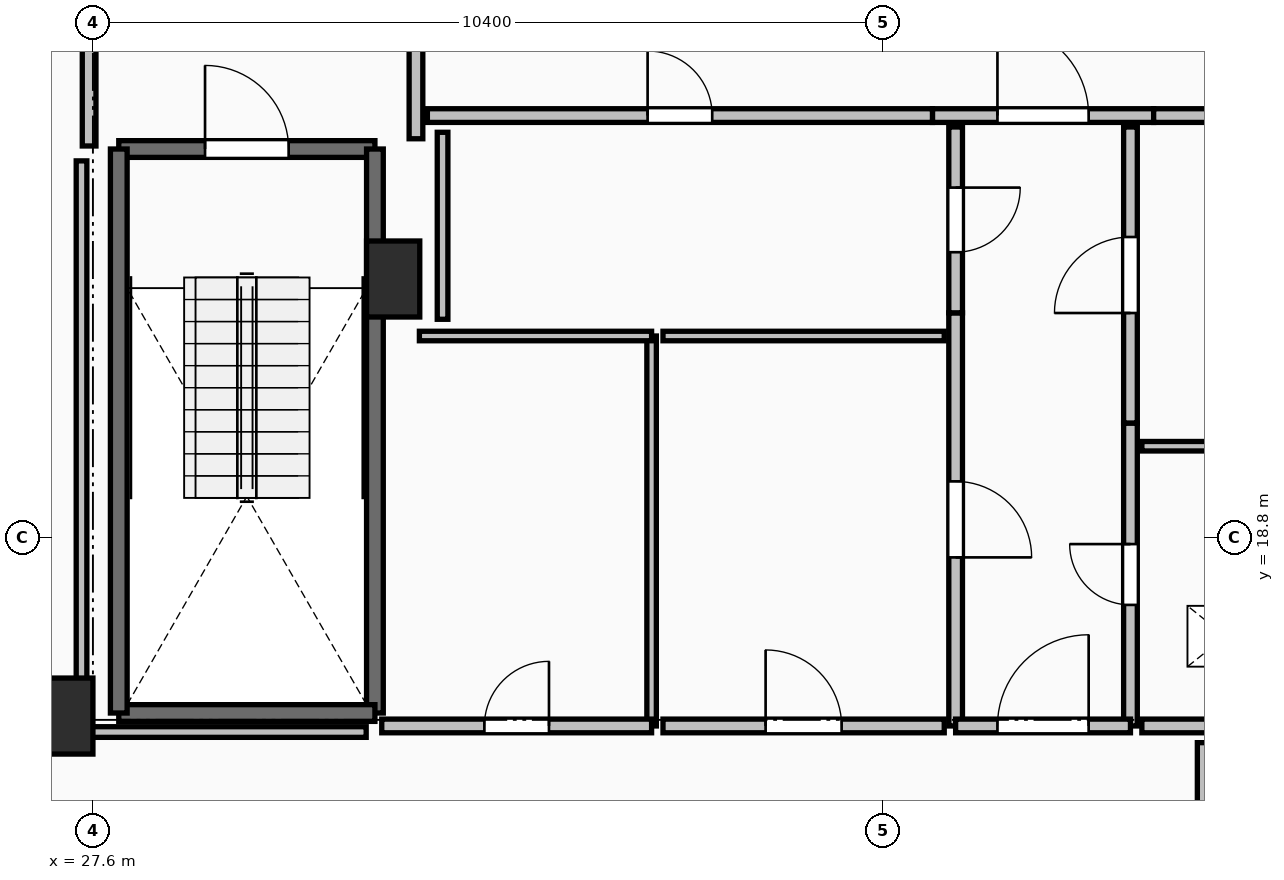
"""IFC4 building model, lengths in metres.
Left out: names, types, materials, properties, quantities, classifications, styles, units other than length and angle.
Written with IfcOpenShell. Run it as: python <this file> out.ifc"""

import sys

from ifc_helpers import new_model, si_unit, direction, frame, frame_2d, origin, origin_2d, place, context, subcontext, project, spatial, rectangle, extrude, element, fill, save


model = new_model("IFC4")
c1 = context("Model", 3, precision=1e-05, world=origin(), true_north=direction((0.0, 1.0)))
c2 = subcontext(c1, "Body", "Model", "MODEL_VIEW")
j1 = project(units=[si_unit("LENGTHUNIT", "METRE"), si_unit("PLANEANGLEUNIT", "RADIAN")], contexts=[c1])
p1 = place(None, origin())
s1 = spatial("IfcSite", under=j1, at=p1, CompositionType="ELEMENT")
p2 = place(p1, origin())
s2 = spatial("IfcBuilding", under=s1, at=p2, CompositionType="ELEMENT")
p3 = place(p2, frame((0.0, 0.0, 276.85)))
s3 = spatial("IfcBuildingStorey", under=s2, at=p3, CompositionType="ELEMENT", Elevation=276.85)
for number, where, z_axis, x_axis in (
    (1, (27.25, 16.45, 0.0), (0.0, 0.0, 1.0), (1.0, 0.0, 0.0)),
    (2, (31.55, 22.2, 0.0), (0.0, 0.0, 1.0), (1.0, 0.0, 0.0)),
):
    element("IfcColumn", number, at=place(p3, frame(where, z_axis=z_axis, x_axis=x_axis)), inside=s3, PredefinedType="PILASTER", context=c2, shape_type="SweptSolid", body=[
        extrude(rectangle(XDim=0.7, YDim=1.0, at=origin_2d()), origin(), (0.0, 0.0, 1.0), 3.55),
    ])
p4 = place(p3, frame((27.94, 23.91, 0.0), z_axis=(0.0, 0.0, 1.0), x_axis=(1.0, 0.0, 0.0)))
e3 = element("IfcWall", 3, at=p4, inside=s3, PredefinedType="SOLIDWALL", context=c2, shape_type="SweptSolid", body=[
    extrude(rectangle(XDim=3.37, YDim=0.22, at=frame_2d((1.685, 0.0))), origin(), (0.0, 0.0, 1.0), 3.19),
])
p5 = place(p4, frame((1.135, 0.0, 0.0)))
e4 = element("IfcOpeningElement", 4, at=p5, cuts=e3, PredefinedType="OPENING", context=c2, shape_type="SweptSolid", body=[
    extrude(rectangle(XDim=1.1, YDim=2.15, at=frame_2d((0.55, 1.075))), frame((0.0, 0.125, 0.0), z_axis=(0.0, -1.0, 0.0), x_axis=(1.0, 0.0, 0.0)), (0.0, 0.0, 1.0), 0.25),
])
p6 = place(p3, frame((31.31, 23.91, 0.0), z_axis=(0.0, 0.0, 1.0), x_axis=(0.0, -1.0, 0.0)))
e5 = element("IfcWall", 5, at=p6, inside=s3, PredefinedType="SOLIDWALL", context=c2, shape_type="SweptSolid", body=[
    extrude(rectangle(XDim=7.42, YDim=0.22, at=frame_2d((3.71, 0.0))), origin(), (0.0, 0.0, 1.0), 3.19),
])
p7 = place(p3, frame((31.31, 16.49, 0.0), z_axis=(0.0, 0.0, 1.0), x_axis=(-1.0, 0.0, 0.0)))
e6 = element("IfcWall", 6, at=p7, inside=s3, PredefinedType="SOLIDWALL", context=c2, shape_type="SweptSolid", body=[
    extrude(rectangle(XDim=3.37, YDim=0.22, at=frame_2d((1.685, 0.0))), origin(), (0.0, 0.0, 1.0), 3.19),
])
p8 = place(p3, frame((27.94, 16.49, 0.0), z_axis=(0.0, 0.0, 1.0), x_axis=(0.0, 1.0, 0.0)))
e7 = element("IfcWall", 7, at=p8, inside=s3, PredefinedType="SOLIDWALL", context=c2, shape_type="SweptSolid", body=[
    extrude(rectangle(XDim=7.42, YDim=0.22, at=frame_2d((3.71, 0.0))), origin(), (0.0, 0.0, 1.0), 3.19),
])
p9 = place(p3, frame((31.85, 24.045, 0.0), z_axis=(0.0, 0.0, 1.0), x_axis=(0.0, 1.0, 0.0)))
e8 = element("IfcWall", 8, at=p9, inside=s3, PredefinedType="PARTITIONING", context=c2, shape_type="SweptSolid", body=[
    extrude(rectangle(XDim=3.91, YDim=0.18, at=frame_2d((1.955, 0.0))), origin(), (0.0, 0.0, 1.0), 3.19),
])
p10 = place(p9, frame((1.355, 0.0, 0.0)))
e9 = element("IfcOpeningElement", 9, at=p10, cuts=e8, PredefinedType="OPENING", context=c2, shape_type="SweptSolid", body=[
    extrude(rectangle(XDim=1.2, YDim=2.15, at=frame_2d((0.6, 1.075))), frame((0.0, 0.105, 0.0), z_axis=(0.0, -1.0, 0.0), x_axis=(1.0, 0.0, 0.0)), (0.0, 0.0, 1.0), 0.21),
])
p11 = place(p3, frame((27.55, 28.0, 0.0), z_axis=(0.0, 0.0, 1.0), x_axis=(0.0, -1.0, 0.0)))
e10 = element("IfcWall", 10, at=p11, inside=s3, PredefinedType="PARTITIONING", context=c2, shape_type="SweptSolid", body=[
    extrude(rectangle(XDim=4.05, YDim=0.18, at=frame_2d((2.025, 0.0))), origin(), (0.0, 0.0, 1.0), 3.19),
])
p12 = place(p11, frame((1.425, 0.0, 0.0)))
e11 = element("IfcOpeningElement", 11, at=p12, cuts=e10, PredefinedType="OPENING", context=c2, shape_type="SweptSolid", body=[
    extrude(rectangle(XDim=1.2, YDim=2.15, at=frame_2d((0.6, 1.075))), frame((0.0, 0.105, 0.0), z_axis=(0.0, -1.0, 0.0), x_axis=(1.0, 0.0, 0.0)), (0.0, 0.0, 1.0), 0.21),
])
p13 = place(p3, frame((38.645, 24.35, 0.0), z_axis=(0.0, 0.0, 1.0), x_axis=(1.0, 0.0, 0.0)))
e12 = element("IfcWall", 12, at=p13, inside=s3, PredefinedType="PARTITIONING", context=c2, shape_type="SweptSolid", body=[
    extrude(rectangle(XDim=2.91, YDim=0.18, at=frame_2d((1.455, 0.0))), origin(), (0.0, 0.0, 1.0), 3.19),
])
p14 = place(p13, frame((0.855, 0.0, 0.0)))
e13 = element("IfcOpeningElement", 13, at=p14, cuts=e12, PredefinedType="OPENING", context=c2, shape_type="SweptSolid", body=[
    extrude(rectangle(XDim=1.2, YDim=2.15, at=frame_2d((0.6, 1.075))), frame((0.0, 0.105, 0.0), z_axis=(0.0, -1.0, 0.0), x_axis=(1.0, 0.0, 0.0)), (0.0, 0.0, 1.0), 0.21),
])
p15 = place(p3, frame((41.555, 24.35, 0.0), z_axis=(0.0, 0.0, 1.0), x_axis=(1.0, 0.0, 0.0)))
e14 = element("IfcWall", 14, at=p15, inside=s3, PredefinedType="PARTITIONING", context=c2, shape_type="SweptSolid", body=[
    extrude(rectangle(XDim=2.445, YDim=0.18, at=frame_2d((1.223, 0.0))), origin(), (0.0, 0.0, 1.0), 3.19),
])
p16 = place(p15, frame((0.722, 0.0, 0.0)))
e15 = element("IfcOpeningElement", 15, at=p16, cuts=e14, PredefinedType="OPENING", context=c2, shape_type="SweptSolid", body=[
    extrude(rectangle(XDim=1.0, YDim=2.15, at=frame_2d((0.5, 1.075))), frame((0.0, 0.105, 0.0), z_axis=(0.0, -1.0, 0.0), x_axis=(1.0, 0.0, 0.0)), (0.0, 0.0, 1.0), 0.21),
])
p17 = place(p3, frame((32.0, 24.35, 0.0), z_axis=(0.0, 0.0, 1.0), x_axis=(1.0, 0.0, 0.0)))
e16 = element("IfcWall", 16, at=p17, inside=s3, PredefinedType="PARTITIONING", context=c2, shape_type="SweptSolid", body=[
    extrude(rectangle(XDim=6.645, YDim=0.18, at=frame_2d((3.323, 0.0))), origin(), (0.0, 0.0, 1.0), 3.19),
])
p18 = place(p17, frame((2.897, 0.0, 0.0)))
e17 = element("IfcOpeningElement", 17, at=p18, cuts=e16, PredefinedType="OPENING", context=c2, shape_type="SweptSolid", body=[
    extrude(rectangle(XDim=0.85, YDim=2.1, at=frame_2d((0.425, 1.05))), frame((0.0, 0.105, 0.0), z_axis=(0.0, -1.0, 0.0), x_axis=(1.0, 0.0, 0.0)), (0.0, 0.0, 1.0), 0.21),
])
p19 = place(p3, frame((41.25, 16.32, 0.0), z_axis=(0.0, 0.0, 1.0), x_axis=(0.0, 1.0, 0.0)))
e18 = element("IfcWall", 18, at=p19, inside=s3, PredefinedType="PARTITIONING", context=c2, shape_type="SweptSolid", body=[
    extrude(rectangle(XDim=3.985, YDim=0.18, at=frame_2d((1.992, 0.0))), origin(), (0.0, 0.0, 1.0), 3.19),
])
p20 = place(p19, frame((1.593, 0.0, 0.0)))
e19 = element("IfcOpeningElement", 19, at=p20, cuts=e18, PredefinedType="OPENING", context=c2, shape_type="SweptSolid", body=[
    extrude(rectangle(XDim=0.8, YDim=2.05, at=frame_2d((0.4, 1.025))), frame((0.0, 0.105, 0.0), z_axis=(0.0, -1.0, 0.0), x_axis=(1.0, 0.0, 0.0)), (0.0, 0.0, 1.0), 0.21),
])
p21 = place(p3, frame((41.25, 20.305, 0.0), z_axis=(0.0, 0.0, 1.0), x_axis=(0.0, 1.0, 0.0)))
e20 = element("IfcWall", 20, at=p21, inside=s3, PredefinedType="PARTITIONING", context=c2, shape_type="SweptSolid", body=[
    extrude(rectangle(XDim=3.895, YDim=0.18, at=frame_2d((1.948, 0.0))), origin(), (0.0, 0.0, 1.0), 3.19),
])
p22 = place(p21, frame((1.448, 0.0, 0.0)))
e21 = element("IfcOpeningElement", 21, at=p22, cuts=e20, PredefinedType="OPENING", context=c2, shape_type="SweptSolid", body=[
    extrude(rectangle(XDim=1.0, YDim=2.15, at=frame_2d((0.5, 1.075))), frame((0.0, 0.105, 0.0), z_axis=(0.0, -1.0, 0.0), x_axis=(1.0, 0.0, 0.0)), (0.0, 0.0, 1.0), 0.21),
])
p23 = place(p3, frame((38.95, 21.755, 0.0), z_axis=(0.0, 0.0, 1.0), x_axis=(0.0, -1.0, 0.0)))
e22 = element("IfcWall", 22, at=p23, inside=s3, PredefinedType="PARTITIONING", context=c2, shape_type="SweptSolid", body=[
    extrude(rectangle(XDim=5.435, YDim=0.18, at=frame_2d((2.717, 0.0))), origin(), (0.0, 0.0, 1.0), 3.19),
])
p24 = place(p23, frame((2.218, 0.0, 0.0)))
e23 = element("IfcOpeningElement", 23, at=p24, cuts=e22, PredefinedType="OPENING", context=c2, shape_type="SweptSolid", body=[
    extrude(rectangle(XDim=1.0, YDim=2.15, at=frame_2d((0.5, 1.075))), frame((0.0, 0.105, 0.0), z_axis=(0.0, -1.0, 0.0), x_axis=(1.0, 0.0, 0.0)), (0.0, 0.0, 1.0), 0.21),
])
p25 = place(p3, frame((38.95, 24.2, 0.0), z_axis=(0.0, 0.0, 1.0), x_axis=(0.0, -1.0, 0.0)))
e24 = element("IfcWall", 24, at=p25, inside=s3, PredefinedType="PARTITIONING", context=c2, shape_type="SweptSolid", body=[
    extrude(rectangle(XDim=2.445, YDim=0.18, at=frame_2d((1.223, 0.0))), origin(), (0.0, 0.0, 1.0), 3.19),
])
p26 = place(p25, frame((0.798, 0.0, 0.0)))
e25 = element("IfcOpeningElement", 25, at=p26, cuts=e24, PredefinedType="OPENING", context=c2, shape_type="SweptSolid", body=[
    extrude(rectangle(XDim=0.85, YDim=2.1, at=frame_2d((0.425, 1.05))), frame((0.0, 0.105, 0.0), z_axis=(0.0, -1.0, 0.0), x_axis=(1.0, 0.0, 0.0)), (0.0, 0.0, 1.0), 0.21),
])
p27 = place(p3, frame((38.95, 16.32, 0.0), z_axis=(0.0, 0.0, 1.0), x_axis=(1.0, 0.0, 0.0)))
e26 = element("IfcWall", 26, at=p27, inside=s3, PredefinedType="PARTITIONING", context=c2, shape_type="SweptSolid", body=[
    extrude(rectangle(XDim=2.3, YDim=0.18, at=frame_2d((1.15, 0.0))), origin(), (0.0, 0.0, 1.0), 3.19),
])
p28 = place(p27, frame((0.55, 0.0, 0.0)))
e27 = element("IfcOpeningElement", 27, at=p28, cuts=e26, PredefinedType="OPENING", context=c2, shape_type="SweptSolid", body=[
    extrude(rectangle(XDim=1.2, YDim=2.15, at=frame_2d((0.6, 1.075))), frame((0.0, 0.105, 0.0), z_axis=(0.0, -1.0, 0.0), x_axis=(1.0, 0.0, 0.0)), (0.0, 0.0, 1.0), 0.21),
])
p29 = place(p3, frame((44.6, 20.0, 0.0), z_axis=(0.0, 0.0, 1.0), x_axis=(-1.0, 0.0, 0.0)))
e28 = element("IfcWall", 28, at=p29, inside=s3, PredefinedType="PARTITIONING", context=c2, shape_type="SweptSolid", body=[
    extrude(rectangle(XDim=3.2, YDim=0.125, at=frame_2d((1.6, 0.0))), origin(), (0.0, 0.0, 1.0), 3.19),
])
p30 = place(p3, frame((41.4, 16.32, 0.0), z_axis=(0.0, 0.0, 1.0), x_axis=(1.0, 0.0, 0.0)))
e29 = element("IfcWall", 29, at=p30, inside=s3, PredefinedType="PARTITIONING", context=c2, shape_type="SweptSolid", body=[
    extrude(rectangle(XDim=3.2, YDim=0.18, at=frame_2d((1.6, 0.0))), origin(), (0.0, 0.0, 1.0), 3.19),
])
p31 = place(p30, frame((1.2, 0.0, 0.0)))
e30 = element("IfcOpeningElement", 30, at=p31, cuts=e29, PredefinedType="OPENING", context=c2, shape_type="SweptSolid", body=[
    extrude(rectangle(XDim=0.8, YDim=2.05, at=frame_2d((0.4, 1.025))), frame((0.0, 0.105, 0.0), z_axis=(0.0, -1.0, 0.0), x_axis=(1.0, 0.0, 0.0)), (0.0, 0.0, 1.0), 0.21),
])
p32 = place(p3, frame((34.95, 16.32, 0.0), z_axis=(0.0, 0.0, 1.0), x_axis=(0.0, 1.0, 0.0)))
e31 = element("IfcWall", 31, at=p32, inside=s3, PredefinedType="PARTITIONING", context=c2, shape_type="SweptSolid", body=[
    extrude(rectangle(XDim=5.13, YDim=0.125, at=frame_2d((2.565, 0.0))), origin(), (0.0, 0.0, 1.0), 3.19),
])
p33 = place(p3, frame((34.95, 21.45, 0.0), z_axis=(0.0, 0.0, 1.0), x_axis=(-1.0, 0.0, 0.0)))
e32 = element("IfcWall", 32, at=p33, inside=s3, PredefinedType="PARTITIONING", context=c2, shape_type="SweptSolid", body=[
    extrude(rectangle(XDim=3.055, YDim=0.125, at=frame_2d((1.527, 0.0))), origin(), (0.0, 0.0, 1.0), 3.19),
])
p34 = place(p3, frame((31.4, 16.32, 0.0), z_axis=(0.0, 0.0, 1.0), x_axis=(1.0, 0.0, 0.0)))
e33 = element("IfcWall", 33, at=p34, inside=s3, PredefinedType="PARTITIONING", context=c2, shape_type="SweptSolid", body=[
    extrude(rectangle(XDim=3.55, YDim=0.18, at=frame_2d((1.775, 0.0))), origin(), (0.0, 0.0, 1.0), 3.19),
])
p35 = place(p34, frame((1.35, 0.0, 0.0)))
e34 = element("IfcOpeningElement", 34, at=p35, cuts=e33, PredefinedType="OPENING", context=c2, shape_type="SweptSolid", body=[
    extrude(rectangle(XDim=0.85, YDim=2.1, at=frame_2d((0.425, 1.05))), frame((0.0, 0.105, 0.0), z_axis=(0.0, -1.0, 0.0), x_axis=(1.0, 0.0, 0.0)), (0.0, 0.0, 1.0), 0.21),
])
p36 = place(p3, frame((38.8, 21.45, 0.0), z_axis=(0.0, 0.0, 1.0), x_axis=(-1.0, 0.0, 0.0)))
e35 = element("IfcWall", 35, at=p36, inside=s3, PredefinedType="PARTITIONING", context=c2, shape_type="SweptSolid", body=[
    extrude(rectangle(XDim=3.7, YDim=0.125, at=frame_2d((1.85, 0.0))), origin(), (0.0, 0.0, 1.0), 3.19),
])
p37 = place(p3, frame((35.1, 16.32, 0.0), z_axis=(0.0, 0.0, 1.0), x_axis=(1.0, 0.0, 0.0)))
e36 = element("IfcWall", 36, at=p37, inside=s3, PredefinedType="PARTITIONING", context=c2, shape_type="SweptSolid", body=[
    extrude(rectangle(XDim=3.7, YDim=0.18, at=frame_2d((1.85, 0.0))), origin(), (0.0, 0.0, 1.0), 3.19),
])
p38 = place(p37, frame((1.35, 0.0, 0.0)))
e37 = element("IfcOpeningElement", 37, at=p38, cuts=e36, PredefinedType="OPENING", context=c2, shape_type="SweptSolid", body=[
    extrude(rectangle(XDim=1.0, YDim=2.15, at=frame_2d((0.5, 1.075))), frame((0.0, 0.105, 0.0), z_axis=(0.0, -1.0, 0.0), x_axis=(1.0, 0.0, 0.0)), (0.0, 0.0, 1.0), 0.21),
])
p39 = place(p3, frame((32.2, 24.13, 0.0), z_axis=(0.0, 0.0, 1.0), x_axis=(0.0, -1.0, 0.0)))
e38 = element("IfcWall", 38, at=p39, inside=s3, PredefinedType="PARTITIONING", context=c2, shape_type="SweptSolid", body=[
    extrude(rectangle(XDim=2.46, YDim=0.14, at=frame_2d((1.23, 0.0))), origin(), (0.0, 0.0, 1.0), 3.19),
])
p40 = place(p3, frame((27.45, 23.754, 0.0), z_axis=(0.0, 0.0, 1.0), x_axis=(0.0, -1.0, 0.0)))
e39 = element("IfcWall", 39, at=p40, inside=s3, PredefinedType="PARTITIONING", context=c2, shape_type="SweptSolid", body=[
    extrude(rectangle(XDim=7.514, YDim=0.14, at=frame_2d((3.757, 0.0))), origin(), (0.0, 0.0, 1.0), 2.382),
])
p41 = place(p3, frame((27.45, 16.24, 0.0), z_axis=(0.0, 0.0, 1.0), x_axis=(1.0, 0.0, 0.0)))
e40 = element("IfcWall", 40, at=p41, inside=s3, PredefinedType="PARTITIONING", context=c2, shape_type="SweptSolid", body=[
    extrude(rectangle(XDim=3.745, YDim=0.14, at=frame_2d((1.873, 0.0))), origin(), (0.0, 0.0, 1.0), 2.382),
])
p42 = place(p3, frame((42.2, 16.1, 0.0), z_axis=(0.0, 0.0, 1.0), x_axis=(0.0, -1.0, 0.0)))
e41 = element("IfcWall", 41, at=p42, inside=s3, PredefinedType="PARTITIONING", context=c2, shape_type="SweptSolid", body=[
    extrude(rectangle(XDim=1.85, YDim=0.14, at=frame_2d((0.925, 0.0))), origin(), (0.0, 0.0, 1.0), 3.19),
])
p43 = place(p5, origin())
e42 = element("IfcDoor", 42, at=p43, inside=s3, OperationType="SINGLE_SWING_LEFT", PredefinedType="DOOR", context=c2, shape_type="SweptSolid", body=[
    extrude(rectangle(XDim=1.1, YDim=2.15, at=frame_2d((0.55, 1.075))), frame((0.0, 0.025, 0.0), z_axis=(0.0, -1.0, 0.0), x_axis=(1.0, 0.0, 0.0)), (0.0, 0.0, 1.0), 0.05),
])
fill(e4, e42)
p44 = place(p14, origin())
e43 = element("IfcDoor", 43, at=p44, inside=s3, OperationType="SINGLE_SWING_LEFT", PredefinedType="DOOR", context=c2, shape_type="SweptSolid", body=[
    extrude(rectangle(XDim=1.2, YDim=2.15, at=frame_2d((0.6, 1.075))), frame((0.0, 0.025, 0.0), z_axis=(0.0, -1.0, 0.0), x_axis=(1.0, 0.0, 0.0)), (0.0, 0.0, 1.0), 0.05),
])
fill(e13, e43)
p45 = place(p18, origin())
e44 = element("IfcDoor", 44, at=p45, inside=s3, OperationType="SINGLE_SWING_LEFT", PredefinedType="DOOR", context=c2, shape_type="SweptSolid", body=[
    extrude(rectangle(XDim=0.85, YDim=2.1, at=frame_2d((0.425, 1.05))), frame((0.0, 0.025, 0.0), z_axis=(0.0, -1.0, 0.0), x_axis=(1.0, 0.0, 0.0)), (0.0, 0.0, 1.0), 0.05),
])
fill(e17, e44)
p46 = place(p20, origin())
e45 = element("IfcDoor", 45, at=p46, inside=s3, OperationType="SINGLE_SWING_RIGHT", PredefinedType="DOOR", context=c2, shape_type="SweptSolid", body=[
    extrude(rectangle(XDim=0.8, YDim=2.05, at=frame_2d((0.4, 1.025))), frame((0.0, 0.025, 0.0), z_axis=(0.0, -1.0, 0.0), x_axis=(1.0, 0.0, 0.0)), (0.0, 0.0, 1.0), 0.05),
])
fill(e19, e45)
p47 = place(p22, origin())
e46 = element("IfcDoor", 46, at=p47, inside=s3, OperationType="SINGLE_SWING_LEFT", PredefinedType="DOOR", context=c2, shape_type="SweptSolid", body=[
    extrude(rectangle(XDim=1.0, YDim=2.15, at=frame_2d((0.5, 1.075))), frame((0.0, 0.025, 0.0), z_axis=(0.0, -1.0, 0.0), x_axis=(1.0, 0.0, 0.0)), (0.0, 0.0, 1.0), 0.05),
])
fill(e21, e46)
p48 = place(p24, origin())
e47 = element("IfcDoor", 47, at=p48, inside=s3, OperationType="SINGLE_SWING_RIGHT", PredefinedType="DOOR", context=c2, shape_type="SweptSolid", body=[
    extrude(rectangle(XDim=1.0, YDim=2.15, at=frame_2d((0.5, 1.075))), frame((0.0, 0.025, 0.0), z_axis=(0.0, -1.0, 0.0), x_axis=(1.0, 0.0, 0.0)), (0.0, 0.0, 1.0), 0.05),
])
fill(e23, e47)
p49 = place(p26, origin())
e48 = element("IfcDoor", 48, at=p49, inside=s3, OperationType="SINGLE_SWING_LEFT", PredefinedType="DOOR", context=c2, shape_type="SweptSolid", body=[
    extrude(rectangle(XDim=0.85, YDim=2.1, at=frame_2d((0.425, 1.05))), frame((0.0, 0.025, 0.0), z_axis=(0.0, -1.0, 0.0), x_axis=(1.0, 0.0, 0.0)), (0.0, 0.0, 1.0), 0.05),
])
fill(e25, e48)
p50 = place(p28, origin())
e49 = element("IfcDoor", 49, at=p50, inside=s3, OperationType="SINGLE_SWING_RIGHT", PredefinedType="DOOR", context=c2, shape_type="SweptSolid", body=[
    extrude(rectangle(XDim=1.2, YDim=2.15, at=frame_2d((0.6, 1.075))), frame((0.0, 0.025, 0.0), z_axis=(0.0, -1.0, 0.0), x_axis=(1.0, 0.0, 0.0)), (0.0, 0.0, 1.0), 0.05),
])
fill(e27, e49)
p51 = place(p35, origin())
e50 = element("IfcDoor", 50, at=p51, inside=s3, OperationType="SINGLE_SWING_RIGHT", PredefinedType="DOOR", context=c2, shape_type="SweptSolid", body=[
    extrude(rectangle(XDim=0.85, YDim=2.1, at=frame_2d((0.425, 1.05))), frame((0.0, 0.025, 0.0), z_axis=(0.0, -1.0, 0.0), x_axis=(1.0, 0.0, 0.0)), (0.0, 0.0, 1.0), 0.05),
])
fill(e34, e50)
p52 = place(p38, origin())
e51 = element("IfcDoor", 51, at=p52, inside=s3, OperationType="SINGLE_SWING_LEFT", PredefinedType="DOOR", context=c2, shape_type="SweptSolid", body=[
    extrude(rectangle(XDim=1.0, YDim=2.15, at=frame_2d((0.5, 1.075))), frame((0.0, 0.025, 0.0), z_axis=(0.0, -1.0, 0.0), x_axis=(1.0, 0.0, 0.0)), (0.0, 0.0, 1.0), 0.05),
])
fill(e37, e51)
save(model, sys.argv[1])
